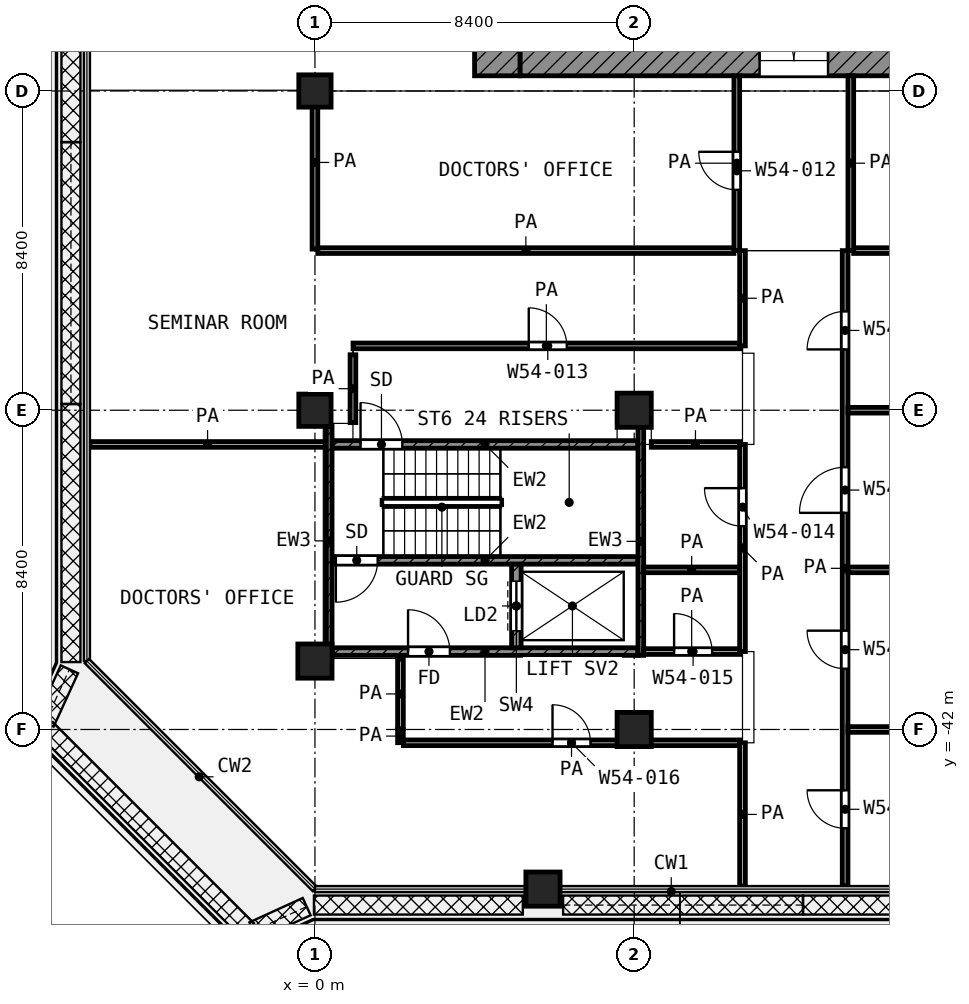
"""IFC4 building model, lengths in metres.
Left out: names, types, materials, properties, quantities, classifications, styles, units other than length and angle.
Written with IfcOpenShell. Run it as: python <this file> out.ifc"""

import sys

from ifc_helpers import new_model, si_unit, direction, frame, frame_2d, origin, origin_2d, place, context, subcontext, project, spatial, rectangle, extrude, element, fill, save


model = new_model("IFC4")
c1 = context("Model", 3, precision=1e-05, world=origin(), true_north=direction((0.0, 1.0)))
c2 = subcontext(c1, "Body", "Model", "MODEL_VIEW")
j1 = project(units=[si_unit("LENGTHUNIT", "METRE"), si_unit("PLANEANGLEUNIT", "RADIAN")], contexts=[c1])
p1 = place(None, origin())
s1 = spatial("IfcSite", under=j1, at=p1, CompositionType="ELEMENT")
p2 = place(p1, origin())
s2 = spatial("IfcBuilding", under=s1, at=p2, CompositionType="ELEMENT")
p3 = place(p2, frame((0.0, 0.0, 234.8)))
s3 = spatial("IfcBuildingStorey", under=s2, at=p3, CompositionType="ELEMENT", Elevation=234.8)
for number, where, z_axis, x_axis in (
    (1, (0.0, -25.2, 0.0), (0.0, 0.0, 1.0), (1.0, 0.0, 0.0)),
    (2, (0.0, -33.6, 0.0), (0.0, 0.0, 1.0), (1.0, 0.0, 0.0)),
):
    element("IfcColumn", number, at=place(p3, frame(where, z_axis=z_axis, x_axis=x_axis)), inside=s3, PredefinedType="COLUMN", context=c2, shape_type="SweptSolid", body=[
        extrude(rectangle(XDim=0.85, YDim=0.85, at=origin_2d()), origin(), (0.0, 0.0, 1.0), 4.2),
    ])
for number, where, z_axis, x_axis in (
    (3, (8.4, -33.6, 0.0), (0.0, 0.0, 1.0), (1.0, 0.0, 0.0)),
    (4, (0.0, -40.2, 0.0), (0.0, 0.0, 1.0), (1.0, 0.0, 0.0)),
    (5, (8.4, -42.0, 0.0), (0.0, 0.0, 1.0), (1.0, 0.0, 0.0)),
    (6, (6.0, -46.2, 0.0), (0.0, 0.0, 1.0), (1.0, 0.0, 0.0)),
):
    element("IfcColumn", number, at=place(p3, frame(where, z_axis=z_axis, x_axis=x_axis)), inside=s3, PredefinedType="COLUMN", context=c2, shape_type="SweptSolid", body=[
        extrude(rectangle(XDim=0.9, YDim=0.9, at=origin_2d()), origin(), (0.0, 0.0, 1.0), 4.2),
    ])
p4 = place(p3, frame((4.8, -24.8, 0.0), z_axis=(0.0, 0.0, 1.0), x_axis=(0.0, 1.0, 0.0)))
e7 = element("IfcWall", 7, at=p4, inside=s3, PredefinedType="SHEAR", context=c2, shape_type="SweptSolid", body=[
    extrude(rectangle(XDim=19.4, YDim=1.2, at=frame_2d((9.7, 0.0))), origin(), (0.0, 0.0, 1.0), 3.6),
])
p5 = place(p4, frame((11.25, 0.0, 0.0)))
e8 = element("IfcOpeningElement", 8, at=p5, cuts=e7, PredefinedType="OPENING", context=c2, shape_type="SweptSolid", body=[
    extrude(rectangle(XDim=1.1, YDim=2.1, at=frame_2d((0.55, 1.05))), frame((0.0, 0.61, 0.0), z_axis=(0.0, -1.0, 0.0), x_axis=(1.0, 0.0, 0.0)), (0.0, 0.0, 1.0), 1.22),
])
p6 = place(p4, frame((1.95, 0.0, 0.0)))
e9 = element("IfcOpeningElement", 9, at=p6, cuts=e7, PredefinedType="OPENING", context=c2, shape_type="SweptSolid", body=[
    extrude(rectangle(XDim=1.1, YDim=2.1, at=frame_2d((0.55, 1.05))), frame((0.0, 0.61, 0.0), z_axis=(0.0, -1.0, 0.0), x_axis=(1.0, 0.0, 0.0)), (0.0, 0.0, 1.0), 1.22),
])
p7 = place(p3, frame((5.4, -24.4, 0.0), z_axis=(0.0, 0.0, 1.0), x_axis=(1.0, 0.0, 0.0)))
e10 = element("IfcWall", 10, at=p7, inside=s3, PredefinedType="SHEAR", context=c2, shape_type="SweptSolid", body=[
    extrude(rectangle(XDim=18.6, YDim=0.8, at=frame_2d((9.3, 0.0))), origin(), (0.0, 0.0, 1.0), 3.6),
])
p8 = place(p7, frame((6.3, 0.0, 0.0)))
e11 = element("IfcOpeningElement", 11, at=p8, cuts=e10, PredefinedType="OPENING", context=c2, shape_type="SweptSolid", body=[
    extrude(rectangle(XDim=1.8, YDim=2.1, at=frame_2d((0.9, 1.05))), frame((0.0, 0.41, 0.0), z_axis=(0.0, -1.0, 0.0), x_axis=(1.0, 0.0, 0.0)), (0.0, 0.0, 1.0), 0.82),
])
p9 = place(p3, frame((0.375, -40.05, 0.0), z_axis=(0.0, 0.0, 1.0), x_axis=(0.0, 1.0, 0.0)))
e12 = element("IfcWall", 12, at=p9, inside=s3, PredefinedType="SHEAR", context=c2, shape_type="SweptSolid", body=[
    extrude(rectangle(XDim=6.025, YDim=0.15, at=frame_2d((3.013, 0.0))), origin(), (0.0, 0.0, 1.0), 3.6),
])
p10 = place(p3, frame((8.575, -40.05, 0.0), z_axis=(0.0, 0.0, 1.0), x_axis=(0.0, 1.0, 0.0)))
e13 = element("IfcWall", 13, at=p10, inside=s3, PredefinedType="SHEAR", context=c2, shape_type="SweptSolid", body=[
    extrude(rectangle(XDim=6.0, YDim=0.15, at=frame_2d((3.0, 0.0))), origin(), (0.0, 0.0, 1.0), 3.6),
])
p11 = place(p3, frame((0.45, -34.5, 0.0), z_axis=(0.0, 0.0, 1.0), x_axis=(1.0, 0.0, 0.0)))
e14 = element("IfcWall", 14, at=p11, inside=s3, PredefinedType="SHEAR", context=c2, shape_type="SweptSolid", body=[
    extrude(rectangle(XDim=8.05, YDim=0.2, at=frame_2d((4.025, 0.0))), origin(), (0.0, 0.0, 1.0), 3.6),
])
p12 = place(p11, frame((0.75, 0.0, 0.0)))
e15 = element("IfcOpeningElement", 15, at=p12, cuts=e14, PredefinedType="OPENING", context=c2, shape_type="SweptSolid", body=[
    extrude(rectangle(XDim=1.1, YDim=2.1, at=frame_2d((0.55, 1.05))), frame((0.0, 0.11, 0.0), z_axis=(0.0, -1.0, 0.0), x_axis=(1.0, 0.0, 0.0)), (0.0, 0.0, 1.0), 0.22),
])
p13 = place(p3, frame((0.45, -37.55, 0.0), z_axis=(0.0, 0.0, 1.0), x_axis=(1.0, 0.0, 0.0)))
e16 = element("IfcWall", 16, at=p13, inside=s3, PredefinedType="SHEAR", context=c2, shape_type="SweptSolid", body=[
    extrude(rectangle(XDim=8.05, YDim=0.2, at=frame_2d((4.025, 0.0))), origin(), (0.0, 0.0, 1.0), 3.6),
])
p14 = place(p13, frame((0.1, 0.0, 0.0)))
e17 = element("IfcOpeningElement", 17, at=p14, cuts=e16, PredefinedType="OPENING", context=c2, shape_type="SweptSolid", body=[
    extrude(rectangle(XDim=1.1, YDim=2.1, at=frame_2d((0.55, 1.05))), frame((0.0, 0.11, 0.0), z_axis=(0.0, -1.0, 0.0), x_axis=(1.0, 0.0, 0.0)), (0.0, 0.0, 1.0), 0.22),
])
p15 = place(p3, frame((0.45, -39.95, 0.0), z_axis=(0.0, 0.0, 1.0), x_axis=(1.0, 0.0, 0.0)))
e18 = element("IfcWall", 18, at=p15, inside=s3, PredefinedType="SHEAR", context=c2, shape_type="SweptSolid", body=[
    extrude(rectangle(XDim=8.05, YDim=0.2, at=frame_2d((4.025, 0.0))), origin(), (0.0, 0.0, 1.0), 3.6),
])
p16 = place(p15, frame((2.0, 0.0, 0.0)))
e19 = element("IfcOpeningElement", 19, at=p16, cuts=e18, PredefinedType="OPENING", context=c2, shape_type="SweptSolid", body=[
    extrude(rectangle(XDim=1.1, YDim=2.1, at=frame_2d((0.55, 1.05))), frame((0.0, 0.11, 0.0), z_axis=(0.0, -1.0, 0.0), x_axis=(1.0, 0.0, 0.0)), (0.0, 0.0, 1.0), 0.22),
])
p17 = place(p3, frame((5.3, -39.85, 0.0), z_axis=(0.0, 0.0, 1.0), x_axis=(0.0, 1.0, 0.0)))
e20 = element("IfcWall", 20, at=p17, inside=s3, PredefinedType="SHEAR", context=c2, shape_type="SweptSolid", body=[
    extrude(rectangle(XDim=2.2, YDim=0.25, at=frame_2d((1.1, 0.0))), origin(), (0.0, 0.0, 1.0), 3.6),
])
p18 = place(p17, frame((0.45, 0.0, 0.0)))
e21 = element("IfcOpeningElement", 21, at=p18, cuts=e20, PredefinedType="OPENING", context=c2, shape_type="SweptSolid", body=[
    extrude(rectangle(XDim=1.3, YDim=2.1, at=frame_2d((0.65, 1.05))), frame((0.0, 0.135, 0.0), z_axis=(0.0, -1.0, 0.0), x_axis=(1.0, 0.0, 0.0)), (0.0, 0.0, 1.0), 0.27),
])
p19 = place(p3, frame((2.327, -42.35, 0.0), z_axis=(0.0, 0.0, 1.0), x_axis=(1.0, 0.0, 0.0)))
e22 = element("IfcWall", 22, at=p19, inside=s3, PredefinedType="PARTITIONING", context=c2, shape_type="SweptSolid", body=[
    extrude(rectangle(XDim=8.848, YDim=0.15, at=frame_2d((4.424, 0.0))), origin(), (0.0, 0.0, 1.0), 3.6),
])
p20 = place(p19, frame((3.924, 0.0, 0.0)))
e23 = element("IfcOpeningElement", 23, at=p20, cuts=e22, PredefinedType="OPENING", context=c2, shape_type="SweptSolid", body=[
    extrude(rectangle(XDim=1.0, YDim=2.1, at=frame_2d((0.5, 1.05))), frame((0.0, 0.085, 0.0), z_axis=(0.0, -1.0, 0.0), x_axis=(1.0, 0.0, 0.0)), (0.0, 0.0, 1.0), 0.17),
])
p21 = place(p3, frame((14.025, -42.0, 0.0), z_axis=(0.0, 0.0, 1.0), x_axis=(1.0, 0.0, 0.0)))
e24 = element("IfcWall", 24, at=p21, inside=s3, PredefinedType="PARTITIONING", context=c2, shape_type="SweptSolid", body=[
    extrude(rectangle(XDim=9.262, YDim=0.15, at=frame_2d((4.631, 0.0))), origin(), (0.0, 0.0, 1.0), 2.7),
])
p22 = place(p3, frame((8.65, -39.95, 0.0), z_axis=(0.0, 0.0, 1.0), x_axis=(1.0, 0.0, 0.0)))
e25 = element("IfcWall", 25, at=p22, inside=s3, PredefinedType="PARTITIONING", context=c2, shape_type="SweptSolid", body=[
    extrude(rectangle(XDim=2.525, YDim=0.15, at=frame_2d((1.263, 0.0))), origin(), (0.0, 0.0, 1.0), 3.6),
])
p23 = place(p22, frame((0.8, 0.0, 0.0)))
e26 = element("IfcOpeningElement", 26, at=p23, cuts=e25, PredefinedType="OPENING", context=c2, shape_type="SweptSolid", body=[
    extrude(rectangle(XDim=1.0, YDim=2.1, at=frame_2d((0.5, 1.05))), frame((0.0, 0.085, 0.0), z_axis=(0.0, -1.0, 0.0), x_axis=(1.0, 0.0, 0.0)), (0.0, 0.0, 1.0), 0.17),
])
p24 = place(p3, frame((8.65, -37.8, 0.0), z_axis=(0.0, 0.0, 1.0), x_axis=(1.0, 0.0, 0.0)))
e27 = element("IfcWall", 27, at=p24, inside=s3, PredefinedType="PARTITIONING", context=c2, shape_type="SweptSolid", body=[
    extrude(rectangle(XDim=2.525, YDim=0.15, at=frame_2d((1.263, 0.0))), origin(), (0.0, 0.0, 1.0), 3.6),
])
p25 = place(p3, frame((14.025, -37.8, 0.0), z_axis=(0.0, 0.0, 1.0), x_axis=(1.0, 0.0, 0.0)))
e28 = element("IfcWall", 28, at=p25, inside=s3, PredefinedType="PARTITIONING", context=c2, shape_type="SweptSolid", body=[
    extrude(rectangle(XDim=11.095, YDim=0.15, at=frame_2d((5.548, 0.0))), origin(), (0.0, 0.0, 1.0), 2.7),
])
p26 = place(p3, frame((-5.92, -34.5, 0.0), z_axis=(0.0, 0.0, 1.0), x_axis=(1.0, 0.0, 0.0)))
e29 = element("IfcWall", 29, at=p26, inside=s3, PredefinedType="PARTITIONING", context=c2, shape_type="SweptSolid", body=[
    extrude(rectangle(XDim=6.19, YDim=0.15, at=frame_2d((3.095, 0.0))), origin(), (0.0, 0.0, 1.0), 3.6),
])
p27 = place(p3, frame((8.85, -34.5, 0.0), z_axis=(0.0, 0.0, 1.0), x_axis=(1.0, 0.0, 0.0)))
e30 = element("IfcWall", 30, at=p27, inside=s3, PredefinedType="PARTITIONING", context=c2, shape_type="SweptSolid", body=[
    extrude(rectangle(XDim=2.325, YDim=0.15, at=frame_2d((1.163, 0.0))), origin(), (0.0, 0.0, 1.0), 3.6),
])
p28 = place(p3, frame((14.025, -33.6, 0.0), z_axis=(0.0, 0.0, 1.0), x_axis=(1.0, 0.0, 0.0)))
e31 = element("IfcWall", 31, at=p28, inside=s3, PredefinedType="PARTITIONING", context=c2, shape_type="SweptSolid", body=[
    extrude(rectangle(XDim=11.095, YDim=0.15, at=frame_2d((5.548, 0.0))), origin(), (0.0, 0.0, 1.0), 2.7),
])
p29 = place(p3, frame((1.002, -31.907, 0.0), z_axis=(0.0, 0.0, 1.0), x_axis=(1.0, 0.0, 0.0)))
e32 = element("IfcWall", 32, at=p29, inside=s3, PredefinedType="PARTITIONING", context=c2, shape_type="SweptSolid", body=[
    extrude(rectangle(XDim=10.173, YDim=0.15, at=frame_2d((5.086, 0.0))), origin(), (0.0, 0.0, 1.0), 3.6),
])
p30 = place(p29, frame((4.624, 0.0, 0.0)))
e33 = element("IfcOpeningElement", 33, at=p30, cuts=e32, PredefinedType="OPENING", context=c2, shape_type="SweptSolid", body=[
    extrude(rectangle(XDim=1.0, YDim=2.1, at=frame_2d((0.5, 1.05))), frame((0.0, 0.085, 0.0), z_axis=(0.0, -1.0, 0.0), x_axis=(1.0, 0.0, 0.0)), (0.0, 0.0, 1.0), 0.17),
])
for number, where, z_axis, x_axis in (
    (34, (0.075, -29.4, 0.0), (0.0, 0.0, 1.0), (1.0, 0.0, 0.0)),
    (35, (14.175, -29.4, 0.0), (0.0, 0.0, 1.0), (1.0, 0.0, 0.0)),
):
    element("IfcWall", number, at=place(p3, frame(where, z_axis=z_axis, x_axis=x_axis)), inside=s3, PredefinedType="PARTITIONING", context=c2, shape_type="SweptSolid", body=[
        extrude(rectangle(XDim=10.95, YDim=0.15, at=frame_2d((5.475, 0.0))), origin(), (0.0, 0.0, 1.0), 3.6),
    ])
p31 = place(p3, frame((0.0, -29.36, 0.0), z_axis=(0.0, 0.0, 1.0), x_axis=(0.0, 1.0, 0.0)))
e36 = element("IfcWall", 36, at=p31, inside=s3, PredefinedType="PARTITIONING", context=c2, shape_type="SweptSolid", body=[
    extrude(rectangle(XDim=4.56, YDim=0.15, at=frame_2d((2.28, 0.0))), origin(), (0.0, 0.0, 1.0), 3.6),
])
p32 = place(p3, frame((1.0, -33.927, 0.0), z_axis=(0.0, 0.0, 1.0), x_axis=(0.0, 1.0, 0.0)))
e37 = element("IfcWall", 37, at=p32, inside=s3, PredefinedType="PARTITIONING", context=c2, shape_type="SweptSolid", body=[
    extrude(rectangle(XDim=1.787, YDim=0.15, at=frame_2d((0.894, 0.0))), origin(), (0.0, 0.0, 1.0), 3.6),
])
p33 = place(p3, frame((2.25, -42.348, 0.0), z_axis=(0.0, 0.0, 1.0), x_axis=(0.0, 1.0, 0.0)))
e38 = element("IfcWall", 38, at=p33, inside=s3, PredefinedType="PARTITIONING", context=c2, shape_type="SweptSolid", body=[
    extrude(rectangle(XDim=0.348, YDim=0.15, at=frame_2d((0.174, 0.0))), origin(), (0.0, 0.0, 1.0), 3.6),
])
p34 = place(p3, frame((2.25, -41.98, 0.0), z_axis=(0.0, 0.0, 1.0), x_axis=(0.0, 1.0, 0.0)))
e39 = element("IfcWall", 39, at=p34, inside=s3, PredefinedType="PARTITIONING", context=c2, shape_type="SweptSolid", body=[
    extrude(rectangle(XDim=1.83, YDim=0.15, at=frame_2d((0.915, 0.0))), origin(), (0.0, 0.0, 1.0), 3.6),
])
p35 = place(p3, frame((11.1, -29.4, 0.0), z_axis=(0.0, 0.0, 1.0), x_axis=(0.0, 1.0, 0.0)))
e40 = element("IfcWall", 40, at=p35, inside=s3, PredefinedType="PARTITIONING", context=c2, shape_type="SweptSolid", body=[
    extrude(rectangle(XDim=4.6, YDim=0.15, at=frame_2d((2.3, 0.0))), origin(), (0.0, 0.0, 1.0), 3.6),
])
p36 = place(p35, frame((1.6, 0.0, 0.0)))
e41 = element("IfcOpeningElement", 41, at=p36, cuts=e40, PredefinedType="OPENING", context=c2, shape_type="SweptSolid", body=[
    extrude(rectangle(XDim=1.0, YDim=2.1, at=frame_2d((0.5, 1.05))), frame((0.0, 0.085, 0.0), z_axis=(0.0, -1.0, 0.0), x_axis=(1.0, 0.0, 0.0)), (0.0, 0.0, 1.0), 0.17),
])
p37 = place(p3, frame((11.25, -46.12, 0.0), z_axis=(0.0, 0.0, 1.0), x_axis=(0.0, 1.0, 0.0)))
e42 = element("IfcWall", 42, at=p37, inside=s3, PredefinedType="PARTITIONING", context=c2, shape_type="SweptSolid", body=[
    extrude(rectangle(XDim=3.77, YDim=0.15, at=frame_2d((1.885, 0.0))), origin(), (0.0, 0.0, 1.0), 3.6),
])
p38 = place(p3, frame((11.25, -39.95, 0.0), z_axis=(0.0, 0.0, 1.0), x_axis=(0.0, 1.0, 0.0)))
e43 = element("IfcWall", 43, at=p38, inside=s3, PredefinedType="PARTITIONING", context=c2, shape_type="SweptSolid", body=[
    extrude(rectangle(XDim=5.45, YDim=0.15, at=frame_2d((2.725, 0.0))), origin(), (0.0, 0.0, 1.0), 3.6),
])
p39 = place(p38, frame((3.3, 0.0, 0.0)))
e44 = element("IfcOpeningElement", 44, at=p39, cuts=e43, PredefinedType="OPENING", context=c2, shape_type="SweptSolid", body=[
    extrude(rectangle(XDim=1.0, YDim=2.1, at=frame_2d((0.5, 1.05))), frame((0.0, 0.085, 0.0), z_axis=(0.0, -1.0, 0.0), x_axis=(1.0, 0.0, 0.0)), (0.0, 0.0, 1.0), 0.17),
])
p40 = place(p3, frame((11.25, -31.907, 0.0), z_axis=(0.0, 0.0, 1.0), x_axis=(0.0, 1.0, 0.0)))
e45 = element("IfcWall", 45, at=p40, inside=s3, PredefinedType="PARTITIONING", context=c2, shape_type="SweptSolid", body=[
    extrude(rectangle(XDim=2.507, YDim=0.15, at=frame_2d((1.253, 0.0))), origin(), (0.0, 0.0, 1.0), 3.6),
])
p41 = place(p3, frame((13.95, -46.12, 0.0), z_axis=(0.0, 0.0, 1.0), x_axis=(0.0, 1.0, 0.0)))
e46 = element("IfcWall", 46, at=p41, inside=s3, PredefinedType="PARTITIONING", context=c2, shape_type="SweptSolid", body=[
    extrude(rectangle(XDim=16.72, YDim=0.15, at=frame_2d((8.36, 0.0))), origin(), (0.0, 0.0, 1.0), 3.6),
])
p42 = place(p41, frame((14.12, 0.0, 0.0)))
e47 = element("IfcOpeningElement", 47, at=p42, cuts=e46, PredefinedType="OPENING", context=c2, shape_type="SweptSolid", body=[
    extrude(rectangle(XDim=1.0, YDim=2.1, at=frame_2d((0.5, 1.05))), frame((0.0, 0.085, 0.0), z_axis=(0.0, -1.0, 0.0), x_axis=(1.0, 0.0, 0.0)), (0.0, 0.0, 1.0), 0.17),
])
p43 = place(p41, frame((9.82, 0.0, 0.0)))
e48 = element("IfcOpeningElement", 48, at=p43, cuts=e46, PredefinedType="OPENING", context=c2, shape_type="SweptSolid", body=[
    extrude(rectangle(XDim=1.2, YDim=2.1, at=frame_2d((0.6, 1.05))), frame((0.0, 0.085, 0.0), z_axis=(0.0, -1.0, 0.0), x_axis=(1.0, 0.0, 0.0)), (0.0, 0.0, 1.0), 0.17),
])
p44 = place(p41, frame((5.72, 0.0, 0.0)))
e49 = element("IfcOpeningElement", 49, at=p44, cuts=e46, PredefinedType="OPENING", context=c2, shape_type="SweptSolid", body=[
    extrude(rectangle(XDim=1.0, YDim=2.1, at=frame_2d((0.5, 1.05))), frame((0.0, 0.085, 0.0), z_axis=(0.0, -1.0, 0.0), x_axis=(1.0, 0.0, 0.0)), (0.0, 0.0, 1.0), 0.17),
])
p45 = place(p41, frame((1.52, 0.0, 0.0)))
e50 = element("IfcOpeningElement", 50, at=p45, cuts=e46, PredefinedType="OPENING", context=c2, shape_type="SweptSolid", body=[
    extrude(rectangle(XDim=1.0, YDim=2.1, at=frame_2d((0.5, 1.05))), frame((0.0, 0.085, 0.0), z_axis=(0.0, -1.0, 0.0), x_axis=(1.0, 0.0, 0.0)), (0.0, 0.0, 1.0), 0.17),
])
p46 = place(p3, frame((14.1, -29.4, 0.0), z_axis=(0.0, 0.0, 1.0), x_axis=(0.0, 1.0, 0.0)))
e51 = element("IfcWall", 51, at=p46, inside=s3, PredefinedType="PARTITIONING", context=c2, shape_type="SweptSolid", body=[
    extrude(rectangle(XDim=4.6, YDim=0.15, at=frame_2d((2.3, 0.0))), origin(), (0.0, 0.0, 1.0), 3.6),
])
p47 = place(p8, origin())
e52 = element("IfcDoor", 52, at=p47, inside=s3, OperationType="DOUBLE_DOOR_SINGLE_SWING", PredefinedType="DOOR", context=c2, shape_type="SweptSolid", body=[
    extrude(rectangle(XDim=1.8, YDim=2.1, at=frame_2d((0.9, 1.05))), frame((0.0, 0.025, 0.0), z_axis=(0.0, -1.0, 0.0), x_axis=(1.0, 0.0, 0.0)), (0.0, 0.0, 1.0), 0.05),
])
fill(e11, e52)
p48 = place(p12, origin())
e53 = element("IfcDoor", 53, at=p48, inside=s3, OperationType="SINGLE_SWING_LEFT", PredefinedType="DOOR", context=c2, shape_type="SweptSolid", body=[
    extrude(rectangle(XDim=1.1, YDim=2.1, at=frame_2d((0.55, 1.05))), frame((0.0, 0.025, 0.0), z_axis=(0.0, -1.0, 0.0), x_axis=(1.0, 0.0, 0.0)), (0.0, 0.0, 1.0), 0.05),
])
fill(e15, e53)
p49 = place(p14, frame((1.1, 0.0, 0.0), z_axis=(0.0, 0.0, 1.0), x_axis=(-1.0, 0.0, 0.0)))
e54 = element("IfcDoor", 54, at=p49, inside=s3, OperationType="SINGLE_SWING_LEFT", PredefinedType="DOOR", context=c2, shape_type="SweptSolid", body=[
    extrude(rectangle(XDim=1.1, YDim=2.1, at=frame_2d((0.55, 1.05))), frame((0.0, 0.025, 0.0), z_axis=(0.0, -1.0, 0.0), x_axis=(1.0, 0.0, 0.0)), (0.0, 0.0, 1.0), 0.05),
])
fill(e17, e54)
p50 = place(p18, origin())
e55 = element("IfcDoor", 55, at=p50, inside=s3, OperationType="DOUBLE_DOOR_SLIDING", PredefinedType="DOOR", context=c2, shape_type="SweptSolid", body=[
    extrude(rectangle(XDim=1.3, YDim=2.1, at=frame_2d((0.65, 1.05))), frame((0.0, 0.025, 0.0), z_axis=(0.0, -1.0, 0.0), x_axis=(1.0, 0.0, 0.0)), (0.0, 0.0, 1.0), 0.05),
])
fill(e21, e55)
p51 = place(p16, origin())
e56 = element("IfcDoor", 56, at=p51, inside=s3, OperationType="SINGLE_SWING_LEFT", PredefinedType="DOOR", context=c2, shape_type="SweptSolid", body=[
    extrude(rectangle(XDim=1.1, YDim=2.1, at=frame_2d((0.55, 1.05))), frame((0.0, 0.025, 0.0), z_axis=(0.0, -1.0, 0.0), x_axis=(1.0, 0.0, 0.0)), (0.0, 0.0, 1.0), 0.05),
])
fill(e19, e56)
p52 = place(p36, origin())
e57 = element("IfcDoor", 57, at=p52, inside=s3, OperationType="SINGLE_SWING_RIGHT", PredefinedType="DOOR", context=c2, shape_type="SweptSolid", body=[
    extrude(rectangle(XDim=1.0, YDim=2.1, at=frame_2d((0.5, 1.05))), frame((0.0, 0.025, 0.0), z_axis=(0.0, -1.0, 0.0), x_axis=(1.0, 0.0, 0.0)), (0.0, 0.0, 1.0), 0.05),
])
fill(e41, e57)
p53 = place(p30, origin())
e58 = element("IfcDoor", 58, at=p53, inside=s3, OperationType="SINGLE_SWING_LEFT", PredefinedType="DOOR", context=c2, shape_type="SweptSolid", body=[
    extrude(rectangle(XDim=1.0, YDim=2.1, at=frame_2d((0.5, 1.05))), frame((0.0, 0.025, 0.0), z_axis=(0.0, -1.0, 0.0), x_axis=(1.0, 0.0, 0.0)), (0.0, 0.0, 1.0), 0.05),
])
fill(e33, e58)
p54 = place(p39, origin())
e59 = element("IfcDoor", 59, at=p54, inside=s3, OperationType="SINGLE_SWING_RIGHT", PredefinedType="DOOR", context=c2, shape_type="SweptSolid", body=[
    extrude(rectangle(XDim=1.0, YDim=2.1, at=frame_2d((0.5, 1.05))), frame((0.0, 0.025, 0.0), z_axis=(0.0, -1.0, 0.0), x_axis=(1.0, 0.0, 0.0)), (0.0, 0.0, 1.0), 0.05),
])
fill(e44, e59)
p55 = place(p23, origin())
e60 = element("IfcDoor", 60, at=p55, inside=s3, OperationType="SINGLE_SWING_LEFT", PredefinedType="DOOR", context=c2, shape_type="SweptSolid", body=[
    extrude(rectangle(XDim=1.0, YDim=2.1, at=frame_2d((0.5, 1.05))), frame((0.0, 0.025, 0.0), z_axis=(0.0, -1.0, 0.0), x_axis=(1.0, 0.0, 0.0)), (0.0, 0.0, 1.0), 0.05),
])
fill(e26, e60)
p56 = place(p20, origin())
e61 = element("IfcDoor", 61, at=p56, inside=s3, OperationType="SINGLE_SWING_LEFT", PredefinedType="DOOR", context=c2, shape_type="SweptSolid", body=[
    extrude(rectangle(XDim=1.0, YDim=2.1, at=frame_2d((0.5, 1.05))), frame((0.0, 0.025, 0.0), z_axis=(0.0, -1.0, 0.0), x_axis=(1.0, 0.0, 0.0)), (0.0, 0.0, 1.0), 0.05),
])
fill(e23, e61)
p57 = place(p42, origin())
e62 = element("IfcDoor", 62, at=p57, inside=s3, OperationType="SINGLE_SWING_LEFT", PredefinedType="DOOR", context=c2, shape_type="SweptSolid", body=[
    extrude(rectangle(XDim=1.0, YDim=2.1, at=frame_2d((0.5, 1.05))), frame((0.0, 0.025, 0.0), z_axis=(0.0, -1.0, 0.0), x_axis=(1.0, 0.0, 0.0)), (0.0, 0.0, 1.0), 0.05),
])
fill(e47, e62)
p58 = place(p43, origin())
e63 = element("IfcDoor", 63, at=p58, inside=s3, OperationType="SINGLE_SWING_LEFT", PredefinedType="DOOR", context=c2, shape_type="SweptSolid", body=[
    extrude(rectangle(XDim=1.2, YDim=2.1, at=frame_2d((0.6, 1.05))), frame((0.0, 0.025, 0.0), z_axis=(0.0, -1.0, 0.0), x_axis=(1.0, 0.0, 0.0)), (0.0, 0.0, 1.0), 0.05),
])
fill(e48, e63)
p59 = place(p44, origin())
e64 = element("IfcDoor", 64, at=p59, inside=s3, OperationType="SINGLE_SWING_RIGHT", PredefinedType="DOOR", context=c2, shape_type="SweptSolid", body=[
    extrude(rectangle(XDim=1.0, YDim=2.1, at=frame_2d((0.5, 1.05))), frame((0.0, 0.025, 0.0), z_axis=(0.0, -1.0, 0.0), x_axis=(1.0, 0.0, 0.0)), (0.0, 0.0, 1.0), 0.05),
])
fill(e49, e64)
p60 = place(p45, origin())
e65 = element("IfcDoor", 65, at=p60, inside=s3, OperationType="SINGLE_SWING_RIGHT", PredefinedType="DOOR", context=c2, shape_type="SweptSolid", body=[
    extrude(rectangle(XDim=1.0, YDim=2.1, at=frame_2d((0.5, 1.05))), frame((0.0, 0.025, 0.0), z_axis=(0.0, -1.0, 0.0), x_axis=(1.0, 0.0, 0.0)), (0.0, 0.0, 1.0), 0.05),
])
fill(e50, e65)
save(model, sys.argv[1])
